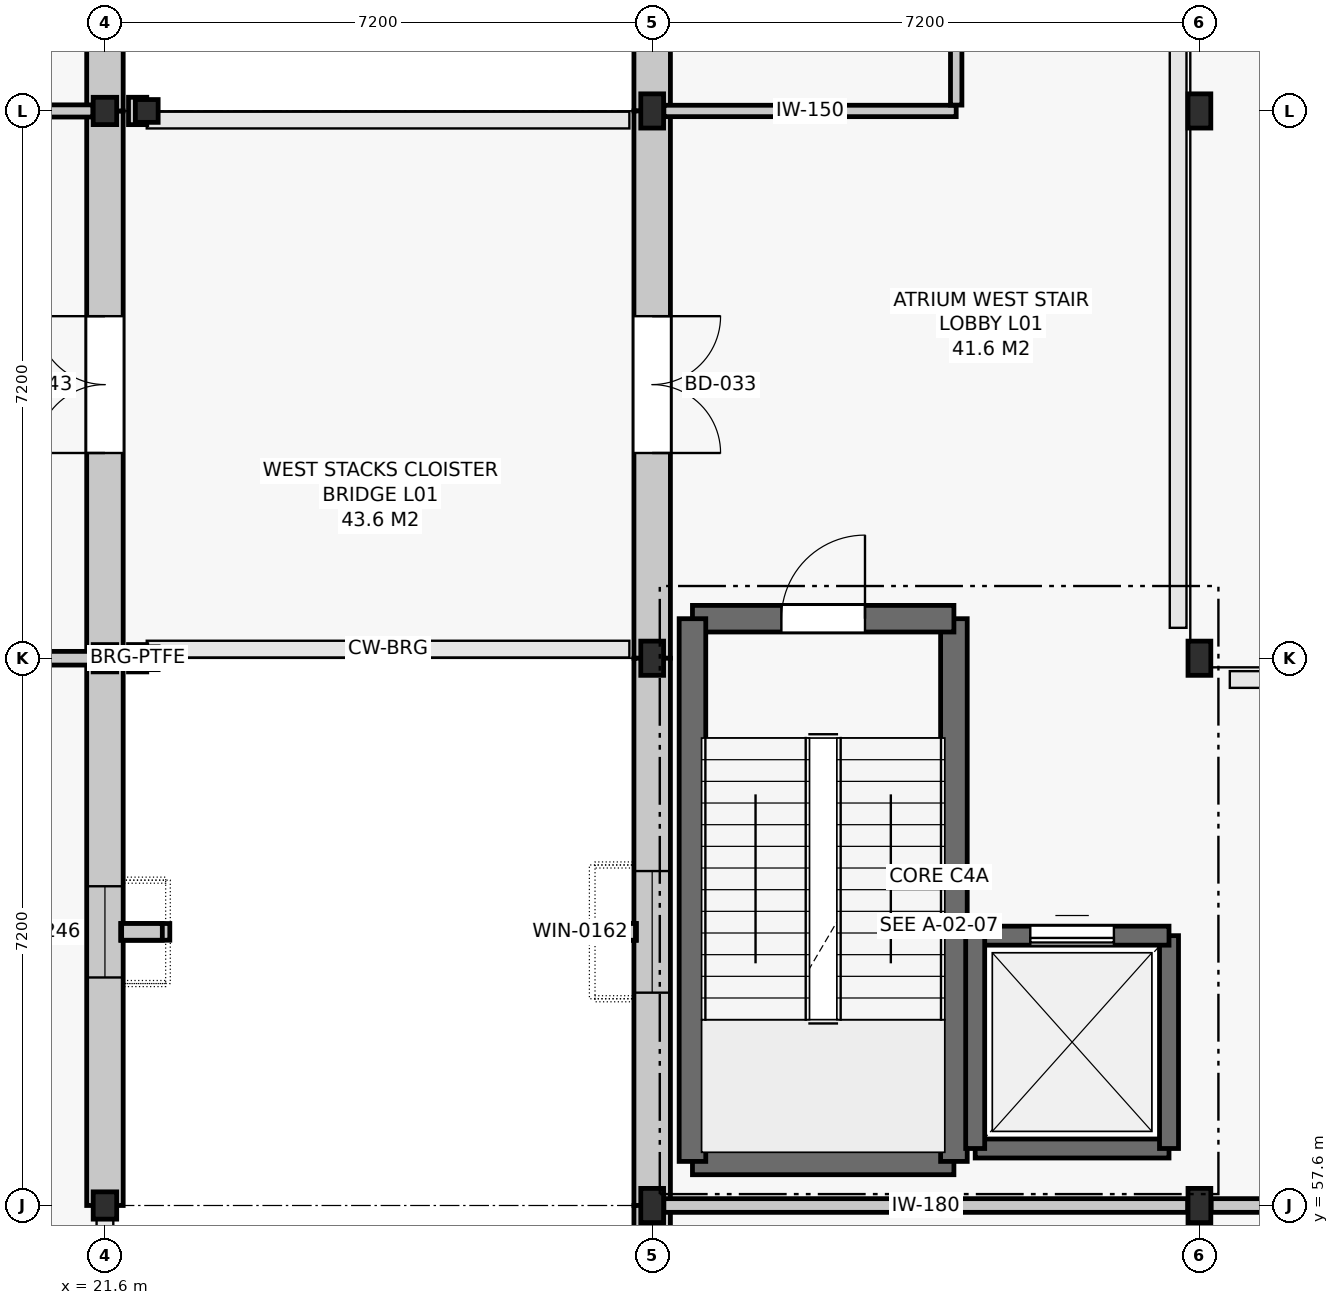
"""IFC4 building model, lengths in metres.
Left out: names, types, materials, properties, quantities, classifications, styles, units other than length and angle.
Written with IfcOpenShell. Run it as: python <this file> out.ifc"""

import sys

from ifc_helpers import new_model, si_unit, direction, frame, frame_2d, origin, origin_2d, place, context, subcontext, project, spatial, rectangle, i_section, extrude, element, fill, save


model = new_model("IFC4")
c1 = context("Model", 3, precision=1e-05, world=origin(), true_north=direction((0.0, 1.0)))
c2 = subcontext(c1, "Body", "Model", "MODEL_VIEW")
j1 = project(units=[si_unit("LENGTHUNIT", "METRE"), si_unit("PLANEANGLEUNIT", "RADIAN")], contexts=[c1])
p1 = place(None, origin())
s1 = spatial("IfcSite", under=j1, at=p1, CompositionType="ELEMENT")
p2 = place(p1, origin())
s2 = spatial("IfcBuilding", under=s1, at=p2, CompositionType="ELEMENT")
p3 = place(p2, frame((0.0, 0.0, 5.4)))
s3 = spatial("IfcBuildingStorey", under=s2, at=p3, CompositionType="ELEMENT", Elevation=5.4)
for number, where, z_axis, x_axis in (
    (1, (28.8, 57.6, 0.0), (0.0, 0.0, 1.0), (1.0, 0.0, 0.0)),
    (2, (28.8, 64.8, 0.0), (0.0, 0.0, 1.0), (1.0, 0.0, 0.0)),
    (3, (28.8, 72.0, 0.0), (0.0, 0.0, 1.0), (1.0, 0.0, 0.0)),
    (4, (36.0, 57.6, 0.0), (0.0, 0.0, 1.0), (1.0, 0.0, 0.0)),
    (5, (36.0, 64.8, 0.0), (0.0, 0.0, 1.0), (1.0, 0.0, 0.0)),
    (6, (36.0, 72.0, 0.0), (0.0, 0.0, 1.0), (1.0, 0.0, 0.0)),
):
    element("IfcColumn", number, at=place(p3, frame(where, z_axis=z_axis, x_axis=x_axis)), inside=s3, PredefinedType="COLUMN", context=c2, shape_type="SweptSolid", body=[
        extrude(i_section(OverallWidth=0.3, OverallDepth=0.45, WebThickness=0.014, FlangeThickness=0.026, FilletRadius=0.027, at=origin_2d()), origin(), (0.0, 0.0, 1.0), 4.8),
    ])
for number, where, z_axis, x_axis in (
    (7, (21.6, 57.6, 0.0), (0.0, 0.0, 1.0), (1.0, 0.0, 0.0)),
    (8, (21.6, 64.8, 0.0), (0.0, 0.0, 1.0), (1.0, 0.0, 0.0)),
    (9, (21.6, 72.0, 0.0), (0.0, 0.0, 1.0), (1.0, 0.0, 0.0)),
):
    element("IfcColumn", number, at=place(p3, frame(where, z_axis=z_axis, x_axis=x_axis)), inside=s3, PredefinedType="COLUMN", context=c2, shape_type="SweptSolid", body=[
        extrude(i_section(OverallWidth=0.309, OverallDepth=0.359, WebThickness=0.021, FlangeThickness=0.035, FilletRadius=0.027, at=origin_2d()), origin(), (0.0, 0.0, 1.0), 4.8),
    ])
for number, where, z_axis, x_axis in (
    (10, (22.15, 64.8, 0.0), (0.0, 0.0, 1.0), (1.0, 0.0, 0.0)),
    (11, (22.15, 72.0, 0.0), (0.0, 0.0, 1.0), (1.0, 0.0, 0.0)),
):
    element("IfcColumn", number, at=place(p3, frame(where, z_axis=z_axis, x_axis=x_axis)), inside=s3, PredefinedType="COLUMN", context=c2, shape_type="SweptSolid", body=[
        extrude(i_section(OverallWidth=0.3, OverallDepth=0.3, WebThickness=0.011, FlangeThickness=0.019, FilletRadius=0.027, at=origin_2d()), origin(), (0.0, 0.0, 1.0), 4.8),
    ])
p4 = place(p3, frame((28.8, 79.2, 0.0), z_axis=(0.0, 0.0, 1.0), x_axis=(0.0, -1.0, 0.0)))
e12 = element("IfcWall", 12, at=p4, inside=s3, PredefinedType="SOLIDWALL", context=c2, shape_type="SweptSolid", body=[
    extrude(rectangle(XDim=7.2, YDim=0.48, at=frame_2d((3.6, 0.0))), origin(), (0.0, 0.0, 1.0), 3.8),
])
p5 = place(p4, frame((2.8, 0.0, 0.95)))
e13 = element("IfcOpeningElement", 13, at=p5, cuts=e12, PredefinedType="OPENING", context=c2, shape_type="SweptSolid", body=[
    extrude(rectangle(XDim=1.6, YDim=2.2, at=frame_2d((0.8, 1.1))), frame((0.0, 0.252, 0.0), z_axis=(0.0, -1.0, 0.0), x_axis=(1.0, 0.0, 0.0)), (0.0, 0.0, 1.0), 0.504),
])
p6 = place(p3, frame((28.8, 72.0, 0.0), z_axis=(0.0, 0.0, 1.0), x_axis=(0.0, -1.0, 0.0)))
e14 = element("IfcWall", 14, at=p6, inside=s3, PredefinedType="SOLIDWALL", context=c2, shape_type="SweptSolid", body=[
    extrude(rectangle(XDim=7.2, YDim=0.48, at=frame_2d((3.6, 0.0))), origin(), (0.0, 0.0, 1.0), 3.8),
])
p7 = place(p6, frame((2.7, 0.0, 0.0)))
e15 = element("IfcOpeningElement", 15, at=p7, cuts=e14, PredefinedType="OPENING", context=c2, shape_type="SweptSolid", body=[
    extrude(rectangle(XDim=1.8, YDim=2.3, at=frame_2d((0.9, 1.15))), frame((0.0, 0.252, 0.0), z_axis=(0.0, -1.0, 0.0), x_axis=(1.0, 0.0, 0.0)), (0.0, 0.0, 1.0), 0.504),
])
p8 = place(p3, frame((28.8, 64.8, 0.0), z_axis=(0.0, 0.0, 1.0), x_axis=(0.0, -1.0, 0.0)))
e16 = element("IfcWall", 16, at=p8, inside=s3, PredefinedType="SOLIDWALL", context=c2, shape_type="SweptSolid", body=[
    extrude(rectangle(XDim=7.2, YDim=0.48, at=frame_2d((3.6, 0.0))), origin(), (0.0, 0.0, 1.0), 3.8),
])
p9 = place(p8, frame((2.8, 0.0, 0.95)))
e17 = element("IfcOpeningElement", 17, at=p9, cuts=e16, PredefinedType="OPENING", context=c2, shape_type="SweptSolid", body=[
    extrude(rectangle(XDim=1.6, YDim=2.2, at=frame_2d((0.8, 1.1))), frame((0.0, 0.252, 0.0), z_axis=(0.0, -1.0, 0.0), x_axis=(1.0, 0.0, 0.0)), (0.0, 0.0, 1.0), 0.504),
])
p10 = place(p3, frame((28.8, 57.6, 0.0), z_axis=(0.0, 0.0, 1.0), x_axis=(0.0, -1.0, 0.0)))
e18 = element("IfcWall", 18, at=p10, inside=s3, PredefinedType="SOLIDWALL", context=c2, shape_type="SweptSolid", body=[
    extrude(rectangle(XDim=6.971, YDim=0.48, at=frame_2d((3.486, 0.0))), origin(), (0.0, 0.0, 1.0), 3.8),
])
p11 = place(p10, frame((2.8, 0.0, 0.95)))
e19 = element("IfcOpeningElement", 19, at=p11, cuts=e18, PredefinedType="OPENING", context=c2, shape_type="SweptSolid", body=[
    extrude(rectangle(XDim=1.6, YDim=2.2, at=frame_2d((0.8, 1.1))), frame((0.0, 0.252, 0.0), z_axis=(0.0, -1.0, 0.0), x_axis=(1.0, 0.0, 0.0)), (0.0, 0.0, 1.0), 0.504),
])
p12 = place(p3, frame((21.6, 57.6, 0.0), z_axis=(0.0, 0.0, 1.0), x_axis=(0.0, 1.0, 0.0)))
e20 = element("IfcWall", 20, at=p12, inside=s3, PredefinedType="SOLIDWALL", context=c2, shape_type="SweptSolid", body=[
    extrude(rectangle(XDim=7.2, YDim=0.48, at=frame_2d((3.6, 0.0))), origin(), (0.0, 0.0, 1.0), 3.78),
])
p13 = place(p12, frame((3.0, 0.0, 0.95)))
e21 = element("IfcOpeningElement", 21, at=p13, cuts=e20, PredefinedType="OPENING", context=c2, shape_type="SweptSolid", body=[
    extrude(rectangle(XDim=1.2, YDim=2.15, at=frame_2d((0.6, 1.075))), frame((0.0, 0.252, 0.0), z_axis=(0.0, -1.0, 0.0), x_axis=(1.0, 0.0, 0.0)), (0.0, 0.0, 1.0), 0.504),
])
p14 = place(p3, frame((21.6, 64.8, 0.0), z_axis=(0.0, 0.0, 1.0), x_axis=(0.0, 1.0, 0.0)))
e22 = element("IfcWall", 22, at=p14, inside=s3, PredefinedType="SOLIDWALL", context=c2, shape_type="SweptSolid", body=[
    extrude(rectangle(XDim=7.2, YDim=0.48, at=frame_2d((3.6, 0.0))), origin(), (0.0, 0.0, 1.0), 3.78),
])
p15 = place(p14, frame((2.7, 0.0, 0.0)))
e23 = element("IfcOpeningElement", 23, at=p15, cuts=e22, PredefinedType="OPENING", context=c2, shape_type="SweptSolid", body=[
    extrude(rectangle(XDim=1.8, YDim=2.3, at=frame_2d((0.9, 1.15))), frame((0.0, 0.252, 0.0), z_axis=(0.0, -1.0, 0.0), x_axis=(1.0, 0.0, 0.0)), (0.0, 0.0, 1.0), 0.504),
])
p16 = place(p3, frame((21.6, 72.0, 0.0), z_axis=(0.0, 0.0, 1.0), x_axis=(0.0, 1.0, 0.0)))
e24 = element("IfcWall", 24, at=p16, inside=s3, PredefinedType="SOLIDWALL", context=c2, shape_type="SweptSolid", body=[
    extrude(rectangle(XDim=7.2, YDim=0.48, at=frame_2d((3.6, 0.0))), origin(), (0.0, 0.0, 1.0), 3.78),
])
p17 = place(p16, frame((3.0, 0.0, 0.95)))
e25 = element("IfcOpeningElement", 25, at=p17, cuts=e24, PredefinedType="OPENING", context=c2, shape_type="SweptSolid", body=[
    extrude(rectangle(XDim=1.2, YDim=2.15, at=frame_2d((0.6, 1.075))), frame((0.0, 0.252, 0.0), z_axis=(0.0, -1.0, 0.0), x_axis=(1.0, 0.0, 0.0)), (0.0, 0.0, 1.0), 0.504),
])
p18 = place(p3, frame((29.33, 58.18, 0.0), z_axis=(0.0, 0.0, 1.0), x_axis=(1.0, 0.0, 0.0)))
e26 = element("IfcWall", 26, at=p18, inside=s3, PredefinedType="SHEAR", context=c2, shape_type="SweptSolid", body=[
    extrude(rectangle(XDim=3.44, YDim=0.35, at=frame_2d((1.72, 0.0))), origin(), (0.0, 0.0, 1.0), 4.52),
])
p19 = place(p3, frame((32.77, 58.18, 0.0), z_axis=(0.0, 0.0, 1.0), x_axis=(0.0, 1.0, 0.0)))
e27 = element("IfcWall", 27, at=p19, inside=s3, PredefinedType="SHEAR", context=c2, shape_type="SweptSolid", body=[
    extrude(rectangle(XDim=7.14, YDim=0.35, at=frame_2d((3.57, 0.0))), origin(), (0.0, 0.0, 1.0), 4.52),
])
p20 = place(p3, frame((32.77, 65.32, 0.0), z_axis=(0.0, 0.0, 1.0), x_axis=(-1.0, 0.0, 0.0)))
e28 = element("IfcWall", 28, at=p20, inside=s3, PredefinedType="SHEAR", context=c2, shape_type="SweptSolid", body=[
    extrude(rectangle(XDim=3.44, YDim=0.35, at=frame_2d((1.72, 0.0))), origin(), (0.0, 0.0, 1.0), 4.52),
])
p21 = place(p20, frame((1.17, 0.0, 0.0)))
e29 = element("IfcOpeningElement", 29, at=p21, cuts=e28, PredefinedType="OPENING", context=c2, shape_type="SweptSolid", body=[
    extrude(rectangle(XDim=1.1, YDim=2.15, at=frame_2d((0.55, 1.075))), frame((0.0, 0.187, 0.0), z_axis=(0.0, -1.0, 0.0), x_axis=(1.0, 0.0, 0.0)), (0.0, 0.0, 1.0), 0.374),
])
p22 = place(p3, frame((29.33, 65.32, 0.0), z_axis=(0.0, 0.0, 1.0), x_axis=(0.0, -1.0, 0.0)))
e30 = element("IfcWall", 30, at=p22, inside=s3, PredefinedType="SHEAR", context=c2, shape_type="SweptSolid", body=[
    extrude(rectangle(XDim=7.14, YDim=0.35, at=frame_2d((3.57, 0.0))), origin(), (0.0, 0.0, 1.0), 4.52),
])
p23 = place(p3, frame((33.05, 58.35, 0.0), z_axis=(0.0, 0.0, 1.0), x_axis=(1.0, 0.0, 0.0)))
e31 = element("IfcWall", 31, at=p23, inside=s3, PredefinedType="SHEAR", context=c2, shape_type="SweptSolid", body=[
    extrude(rectangle(XDim=2.55, YDim=0.25, at=frame_2d((1.275, 0.0))), origin(), (0.0, 0.0, 1.0), 4.52),
])
p24 = place(p3, frame((35.6, 58.35, 0.0), z_axis=(0.0, 0.0, 1.0), x_axis=(0.0, 1.0, 0.0)))
e32 = element("IfcWall", 32, at=p24, inside=s3, PredefinedType="SHEAR", context=c2, shape_type="SweptSolid", body=[
    extrude(rectangle(XDim=2.8, YDim=0.25, at=frame_2d((1.4, 0.0))), origin(), (0.0, 0.0, 1.0), 4.52),
])
p25 = place(p3, frame((35.6, 61.15, 0.0), z_axis=(0.0, 0.0, 1.0), x_axis=(-1.0, 0.0, 0.0)))
e33 = element("IfcWall", 33, at=p25, inside=s3, PredefinedType="SHEAR", context=c2, shape_type="SweptSolid", body=[
    extrude(rectangle(XDim=2.55, YDim=0.25, at=frame_2d((1.275, 0.0))), origin(), (0.0, 0.0, 1.0), 4.52),
])
p26 = place(p25, frame((0.725, 0.0, 0.0)))
e34 = element("IfcOpeningElement", 34, at=p26, cuts=e33, PredefinedType="OPENING", context=c2, shape_type="SweptSolid", body=[
    extrude(rectangle(XDim=1.1, YDim=2.1, at=frame_2d((0.55, 1.05))), frame((0.0, 0.137, 0.0), z_axis=(0.0, -1.0, 0.0), x_axis=(1.0, 0.0, 0.0)), (0.0, 0.0, 1.0), 0.274),
])
p27 = place(p3, frame((33.05, 61.15, 0.0), z_axis=(0.0, 0.0, 1.0), x_axis=(0.0, -1.0, 0.0)))
e35 = element("IfcWall", 35, at=p27, inside=s3, PredefinedType="SHEAR", context=c2, shape_type="SweptSolid", body=[
    extrude(rectangle(XDim=2.8, YDim=0.25, at=frame_2d((1.4, 0.0))), origin(), (0.0, 0.0, 1.0), 4.52),
])
p28 = place(p3, frame((28.954, 72.0, 0.0), z_axis=(0.0, 0.0, 1.0), x_axis=(1.0, 0.0, 0.0)))
e36 = element("IfcWall", 36, at=p28, inside=s3, PredefinedType="PARTITIONING", context=c2, shape_type="SweptSolid", body=[
    extrude(rectangle(XDim=3.846, YDim=0.15, at=frame_2d((1.923, 0.0))), origin(), (0.0, 0.0, 1.0), 4.065),
])
for number, where, z_axis, x_axis in (
    (37, (28.954, 57.6, 0.0), (0.0, 0.0, 1.0), (1.0, 0.0, 0.0)),
    (38, (36.154, 57.6, 0.0), (0.0, 0.0, 1.0), (1.0, 0.0, 0.0)),
):
    element("IfcWall", number, at=place(p3, frame(where, z_axis=z_axis, x_axis=x_axis)), inside=s3, PredefinedType="PARTITIONING", context=c2, shape_type="SweptSolid", body=[
        extrude(rectangle(XDim=6.892, YDim=0.18, at=frame_2d((3.446, 0.0))), origin(), (0.0, 0.0, 1.0), 4.065),
    ])
p29 = place(p3, frame((14.559, 72.0, 0.0), z_axis=(0.0, 0.0, 1.0), x_axis=(1.0, 0.0, 0.0)))
e39 = element("IfcWall", 39, at=p29, inside=s3, PredefinedType="PARTITIONING", context=c2, shape_type="SweptSolid", body=[
    extrude(rectangle(XDim=6.883, YDim=0.16, at=frame_2d((3.441, 0.0))), origin(), (0.0, 0.0, 1.0), 3.885),
])
p30 = place(p3, frame((14.559, 64.8, 0.0), z_axis=(0.0, 0.0, 1.0), x_axis=(1.0, 0.0, 0.0)))
e40 = element("IfcWall", 40, at=p30, inside=s3, PredefinedType="PARTITIONING", context=c2, shape_type="SweptSolid", body=[
    extrude(rectangle(XDim=6.883, YDim=0.18, at=frame_2d((3.441, 0.0))), origin(), (0.0, 0.0, 1.0), 3.885),
])
p31 = place(p30, frame((2.616, 0.0, 0.0)))
e41 = element("IfcOpeningElement", 41, at=p31, cuts=e40, PredefinedType="OPENING", context=c2, shape_type="SweptSolid", body=[
    extrude(rectangle(XDim=1.65, YDim=2.25, at=frame_2d((0.825, 1.125))), frame((0.0, 0.102, 0.0), z_axis=(0.0, -1.0, 0.0), x_axis=(1.0, 0.0, 0.0)), (0.0, 0.0, 1.0), 0.204),
])
p32 = place(p3, frame((32.8, 72.077, 0.0), z_axis=(0.0, 0.0, 1.0), x_axis=(0.0, 1.0, 0.0)))
e42 = element("IfcWall", 42, at=p32, inside=s3, PredefinedType="PARTITIONING", context=c2, shape_type="SweptSolid", body=[
    extrude(rectangle(XDim=6.046, YDim=0.15, at=frame_2d((3.023, 0.0))), origin(), (0.0, 0.0, 1.0), 4.065),
])
p33 = place(p32, frame((2.533, 0.0, 0.0)))
e43 = element("IfcOpeningElement", 43, at=p33, cuts=e42, PredefinedType="OPENING", context=c2, shape_type="SweptSolid", body=[
    extrude(rectangle(XDim=0.98, YDim=2.1, at=frame_2d((0.49, 1.05))), frame((0.0, 0.087, 0.0), z_axis=(0.0, -1.0, 0.0), x_axis=(1.0, 0.0, 0.0)), (0.0, 0.0, 1.0), 0.174),
])
p34 = place(p7, origin())
e44 = element("IfcDoor", 44, at=p34, inside=s3, OperationType="DOUBLE_DOOR_SINGLE_SWING", PredefinedType="DOOR", context=c2, shape_type="SweptSolid", body=[
    extrude(rectangle(XDim=1.8, YDim=2.3, at=frame_2d((0.9, 1.15))), frame((0.0, 0.025, 0.0), z_axis=(0.0, -1.0, 0.0), x_axis=(1.0, 0.0, 0.0)), (0.0, 0.0, 1.0), 0.05),
])
fill(e15, e44)
p35 = place(p9, origin())
e45 = element("IfcWindow", 45, at=p35, inside=s3, PartitioningType="SINGLE_PANEL", PredefinedType="WINDOW", context=c2, shape_type="SweptSolid", body=[
    extrude(rectangle(XDim=1.6, YDim=2.2, at=frame_2d((0.8, 1.1))), frame((0.0, 0.03, 0.0), z_axis=(0.0, -1.0, 0.0), x_axis=(1.0, 0.0, 0.0)), (0.0, 0.0, 1.0), 0.06),
])
fill(e17, e45)
p36 = place(p13, origin())
e46 = element("IfcWindow", 46, at=p36, inside=s3, PartitioningType="SINGLE_PANEL", PredefinedType="WINDOW", context=c2, shape_type="SweptSolid", body=[
    extrude(rectangle(XDim=1.2, YDim=2.15, at=frame_2d((0.6, 1.075))), frame((0.0, 0.03, 0.0), z_axis=(0.0, -1.0, 0.0), x_axis=(1.0, 0.0, 0.0)), (0.0, 0.0, 1.0), 0.06),
])
fill(e21, e46)
p37 = place(p15, origin())
e47 = element("IfcDoor", 47, at=p37, inside=s3, OperationType="DOUBLE_DOOR_SINGLE_SWING", PredefinedType="DOOR", context=c2, shape_type="SweptSolid", body=[
    extrude(rectangle(XDim=1.8, YDim=2.3, at=frame_2d((0.9, 1.15))), frame((0.0, 0.025, 0.0), z_axis=(0.0, -1.0, 0.0), x_axis=(1.0, 0.0, 0.0)), (0.0, 0.0, 1.0), 0.05),
])
fill(e23, e47)
p38 = place(p21, frame((1.1, 0.0, 0.0), z_axis=(0.0, 0.0, 1.0), x_axis=(-1.0, 0.0, 0.0)))
e48 = element("IfcDoor", 48, at=p38, inside=s3, OperationType="SINGLE_SWING_RIGHT", PredefinedType="DOOR", context=c2, shape_type="SweptSolid", body=[
    extrude(rectangle(XDim=1.1, YDim=2.15, at=frame_2d((0.55, 1.075))), frame((0.0, 0.025, 0.0), z_axis=(0.0, -1.0, 0.0), x_axis=(1.0, 0.0, 0.0)), (0.0, 0.0, 1.0), 0.05),
])
fill(e29, e48)
p39 = place(p26, origin())
e49 = element("IfcDoor", 49, at=p39, inside=s3, OperationType="SLIDING_TO_LEFT", PredefinedType="DOOR", context=c2, shape_type="SweptSolid", body=[
    extrude(rectangle(XDim=1.1, YDim=2.1, at=frame_2d((0.55, 1.05))), frame((0.0, 0.025, 0.0), z_axis=(0.0, -1.0, 0.0), x_axis=(1.0, 0.0, 0.0)), (0.0, 0.0, 1.0), 0.05),
])
fill(e34, e49)
save(model, sys.argv[1])
